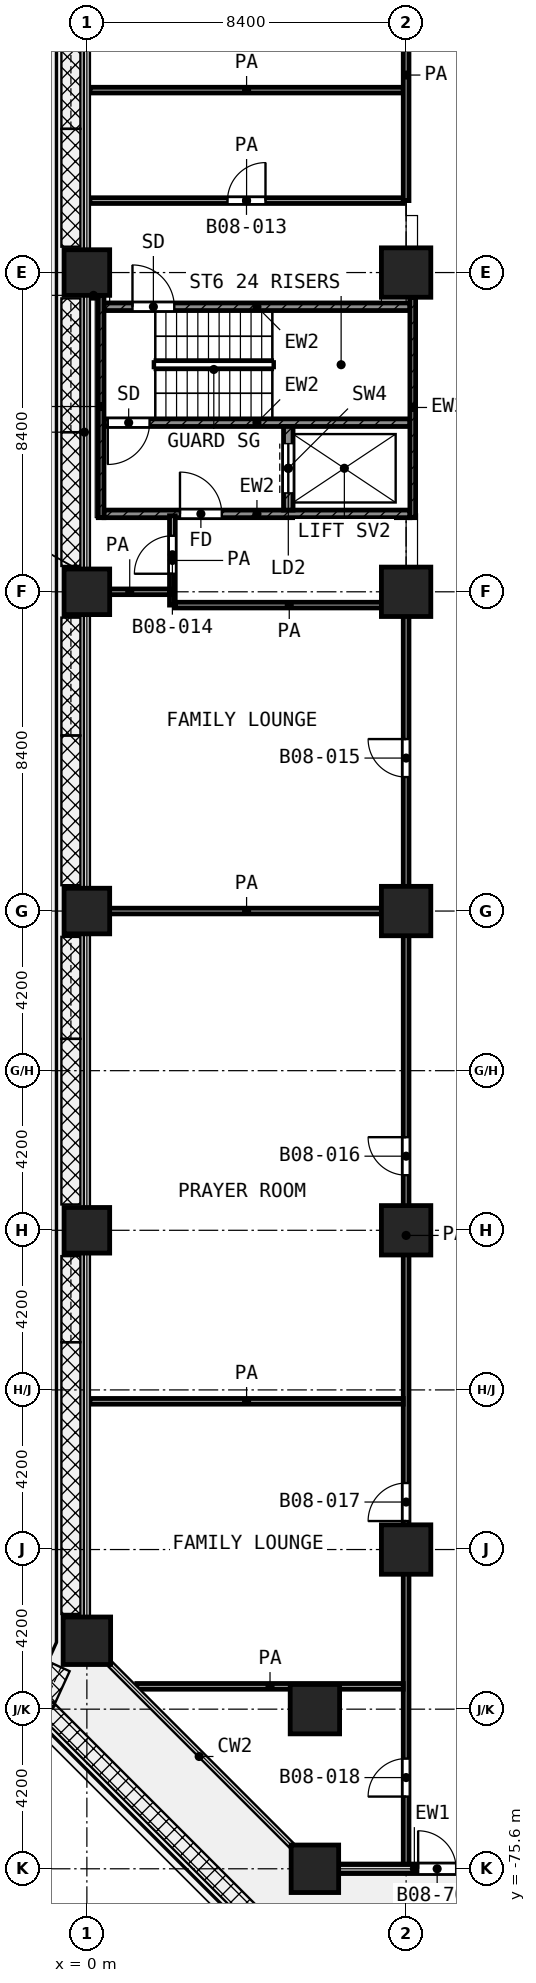
"""IFC4 building model, lengths in metres.
Left out: names, types, materials, properties, quantities, classifications, styles, units other than length and angle.
Written with IfcOpenShell. Run it as: python <this file> out.ifc"""

import sys

from ifc_helpers import new_model, si_unit, direction, frame, frame_2d, origin, origin_2d, place, context, subcontext, project, spatial, rectangle, extrude, element, fill, save


model = new_model("IFC4")
c1 = context("Model", 3, precision=1e-05, world=origin(), true_north=direction((0.0, 1.0)))
c2 = subcontext(c1, "Body", "Model", "MODEL_VIEW")
j1 = project(units=[si_unit("LENGTHUNIT", "METRE"), si_unit("PLANEANGLEUNIT", "RADIAN")], contexts=[c1])
p1 = place(None, origin())
s1 = spatial("IfcSite", under=j1, at=p1, CompositionType="ELEMENT")
p2 = place(p1, origin())
s2 = spatial("IfcBuilding", under=s1, at=p2, CompositionType="ELEMENT")
p3 = place(p2, frame((0.0, 0.0, 39.2)))
s3 = spatial("IfcBuildingStorey", under=s2, at=p3, CompositionType="ELEMENT", Elevation=39.2)
p4 = place(p3, frame((0.0, -33.6, 0.0), z_axis=(0.0, 0.0, 1.0), x_axis=(1.0, 0.0, 0.0)))
e1 = element("IfcColumn", 1, at=p4, inside=s3, PredefinedType="COLUMN", context=c2, shape_type="SweptSolid", body=[
    extrude(rectangle(XDim=1.2, YDim=1.2, at=origin_2d()), origin(), (0.0, 0.0, 1.0), 4.2),
])
p5 = place(p3, frame((8.4, -33.6, 0.0), z_axis=(0.0, 0.0, 1.0), x_axis=(1.0, 0.0, 0.0)))
e2 = element("IfcColumn", 2, at=p5, inside=s3, PredefinedType="COLUMN", context=c2, shape_type="SweptSolid", body=[
    extrude(rectangle(XDim=1.3, YDim=1.3, at=origin_2d()), origin(), (0.0, 0.0, 1.0), 4.2),
])
p6 = place(p3, frame((0.0, -42.0, 0.0), z_axis=(0.0, 0.0, 1.0), x_axis=(1.0, 0.0, 0.0)))
e3 = element("IfcColumn", 3, at=p6, inside=s3, PredefinedType="COLUMN", context=c2, shape_type="SweptSolid", body=[
    extrude(rectangle(XDim=1.2, YDim=1.2, at=origin_2d()), origin(), (0.0, 0.0, 1.0), 4.2),
])
p7 = place(p3, frame((8.4, -42.0, 0.0), z_axis=(0.0, 0.0, 1.0), x_axis=(1.0, 0.0, 0.0)))
e4 = element("IfcColumn", 4, at=p7, inside=s3, PredefinedType="COLUMN", context=c2, shape_type="SweptSolid", body=[
    extrude(rectangle(XDim=1.3, YDim=1.3, at=origin_2d()), origin(), (0.0, 0.0, 1.0), 4.2),
])
p8 = place(p3, frame((0.0, -50.4, 0.0), z_axis=(0.0, 0.0, 1.0), x_axis=(1.0, 0.0, 0.0)))
e5 = element("IfcColumn", 5, at=p8, inside=s3, PredefinedType="COLUMN", context=c2, shape_type="SweptSolid", body=[
    extrude(rectangle(XDim=1.2, YDim=1.2, at=origin_2d()), origin(), (0.0, 0.0, 1.0), 4.2),
])
p9 = place(p3, frame((8.4, -50.4, 0.0), z_axis=(0.0, 0.0, 1.0), x_axis=(1.0, 0.0, 0.0)))
e6 = element("IfcColumn", 6, at=p9, inside=s3, PredefinedType="COLUMN", context=c2, shape_type="SweptSolid", body=[
    extrude(rectangle(XDim=1.3, YDim=1.3, at=origin_2d()), origin(), (0.0, 0.0, 1.0), 4.2),
])
p10 = place(p3, frame((0.0, -58.8, 0.0), z_axis=(0.0, 0.0, 1.0), x_axis=(1.0, 0.0, 0.0)))
e7 = element("IfcColumn", 7, at=p10, inside=s3, PredefinedType="COLUMN", context=c2, shape_type="SweptSolid", body=[
    extrude(rectangle(XDim=1.2, YDim=1.2, at=origin_2d()), origin(), (0.0, 0.0, 1.0), 4.2),
])
for number, where, z_axis, x_axis in (
    (8, (8.4, -58.8, 0.0), (0.0, 0.0, 1.0), (1.0, 0.0, 0.0)),
    (9, (8.4, -67.2, 0.0), (0.0, 0.0, 1.0), (1.0, 0.0, 0.0)),
):
    element("IfcColumn", number, at=place(p3, frame(where, z_axis=z_axis, x_axis=x_axis)), inside=s3, PredefinedType="COLUMN", context=c2, shape_type="SweptSolid", body=[
        extrude(rectangle(XDim=1.3, YDim=1.3, at=origin_2d()), origin(), (0.0, 0.0, 1.0), 4.2),
    ])
p11 = place(p3, frame((0.0, -69.6, 0.0), z_axis=(0.0, 0.0, 1.0), x_axis=(1.0, 0.0, 0.0)))
e10 = element("IfcColumn", 10, at=p11, inside=s3, PredefinedType="COLUMN", context=c2, shape_type="SweptSolid", body=[
    extrude(rectangle(XDim=1.25, YDim=1.25, at=origin_2d()), origin(), (0.0, 0.0, 1.0), 4.2),
])
p12 = place(p3, frame((6.0, -71.4, 0.0), z_axis=(0.0, 0.0, 1.0), x_axis=(1.0, 0.0, 0.0)))
e11 = element("IfcColumn", 11, at=p12, inside=s3, PredefinedType="COLUMN", context=c2, shape_type="SweptSolid", body=[
    extrude(rectangle(XDim=1.3, YDim=1.3, at=origin_2d()), origin(), (0.0, 0.0, 1.0), 4.2),
])
p13 = place(p3, frame((6.0, -75.6, 0.0), z_axis=(0.0, 0.0, 1.0), x_axis=(1.0, 0.0, 0.0)))
e12 = element("IfcColumn", 12, at=p13, inside=s3, PredefinedType="COLUMN", context=c2, shape_type="SweptSolid", body=[
    extrude(rectangle(XDim=1.25, YDim=1.25, at=origin_2d()), origin(), (0.0, 0.0, 1.0), 4.2),
])
p14 = place(p3, frame((6.625, -75.6, 0.0), z_axis=(0.0, 0.0, 1.0), x_axis=(1.0, 0.0, 0.0)))
e13 = element("IfcWall", 13, at=p14, inside=s3, PredefinedType="SOLIDWALL", context=c2, shape_type="SweptSolid", body=[
    extrude(rectangle(XDim=3.983, YDim=0.25, at=frame_2d((1.992, 0.0))), origin(), (0.0, 0.0, 1.0), 3.78),
])
p15 = place(p14, frame((2.092, 0.0, 0.0)))
e14 = element("IfcOpeningElement", 14, at=p15, cuts=e13, PredefinedType="OPENING", context=c2, shape_type="SweptSolid", body=[
    extrude(rectangle(XDim=1.0, YDim=2.1, at=frame_2d((0.5, 1.05))), frame((0.0, 0.135, 0.0), z_axis=(0.0, -1.0, 0.0), x_axis=(1.0, 0.0, 0.0)), (0.0, 0.0, 1.0), 0.27),
])
p16 = place(p3, frame((0.375, -40.05, 0.0), z_axis=(0.0, 0.0, 1.0), x_axis=(0.0, 1.0, 0.0)))
e15 = element("IfcWall", 15, at=p16, inside=s3, PredefinedType="SHEAR", context=c2, shape_type="SweptSolid", body=[
    extrude(rectangle(XDim=5.85, YDim=0.15, at=frame_2d((2.925, 0.0))), origin(), (0.0, 0.0, 1.0), 3.9),
])
p17 = place(p3, frame((8.575, -40.05, 0.0), z_axis=(0.0, 0.0, 1.0), x_axis=(0.0, 1.0, 0.0)))
e16 = element("IfcWall", 16, at=p17, inside=s3, PredefinedType="SHEAR", context=c2, shape_type="SweptSolid", body=[
    extrude(rectangle(XDim=5.8, YDim=0.15, at=frame_2d((2.9, 0.0))), origin(), (0.0, 0.0, 1.0), 3.9),
])
p18 = place(p3, frame((0.45, -34.5, 0.0), z_axis=(0.0, 0.0, 1.0), x_axis=(1.0, 0.0, 0.0)))
e17 = element("IfcWall", 17, at=p18, inside=s3, PredefinedType="SHEAR", context=c2, shape_type="SweptSolid", body=[
    extrude(rectangle(XDim=8.05, YDim=0.2, at=frame_2d((4.025, 0.0))), origin(), (0.0, 0.0, 1.0), 3.9),
])
p19 = place(p18, frame((0.75, 0.0, 0.0)))
e18 = element("IfcOpeningElement", 18, at=p19, cuts=e17, PredefinedType="OPENING", context=c2, shape_type="SweptSolid", body=[
    extrude(rectangle(XDim=1.1, YDim=2.1, at=frame_2d((0.55, 1.05))), frame((0.0, 0.11, 0.0), z_axis=(0.0, -1.0, 0.0), x_axis=(1.0, 0.0, 0.0)), (0.0, 0.0, 1.0), 0.22),
])
p20 = place(p3, frame((0.45, -37.55, 0.0), z_axis=(0.0, 0.0, 1.0), x_axis=(1.0, 0.0, 0.0)))
e19 = element("IfcWall", 19, at=p20, inside=s3, PredefinedType="SHEAR", context=c2, shape_type="SweptSolid", body=[
    extrude(rectangle(XDim=8.05, YDim=0.2, at=frame_2d((4.025, 0.0))), origin(), (0.0, 0.0, 1.0), 3.9),
])
p21 = place(p20, frame((0.1, 0.0, 0.0)))
e20 = element("IfcOpeningElement", 20, at=p21, cuts=e19, PredefinedType="OPENING", context=c2, shape_type="SweptSolid", body=[
    extrude(rectangle(XDim=1.1, YDim=2.1, at=frame_2d((0.55, 1.05))), frame((0.0, 0.11, 0.0), z_axis=(0.0, -1.0, 0.0), x_axis=(1.0, 0.0, 0.0)), (0.0, 0.0, 1.0), 0.22),
])
p22 = place(p3, frame((0.45, -39.95, 0.0), z_axis=(0.0, 0.0, 1.0), x_axis=(1.0, 0.0, 0.0)))
e21 = element("IfcWall", 21, at=p22, inside=s3, PredefinedType="SHEAR", context=c2, shape_type="SweptSolid", body=[
    extrude(rectangle(XDim=8.05, YDim=0.2, at=frame_2d((4.025, 0.0))), origin(), (0.0, 0.0, 1.0), 3.9),
])
p23 = place(p22, frame((2.0, 0.0, 0.0)))
e22 = element("IfcOpeningElement", 22, at=p23, cuts=e21, PredefinedType="OPENING", context=c2, shape_type="SweptSolid", body=[
    extrude(rectangle(XDim=1.1, YDim=2.1, at=frame_2d((0.55, 1.05))), frame((0.0, 0.11, 0.0), z_axis=(0.0, -1.0, 0.0), x_axis=(1.0, 0.0, 0.0)), (0.0, 0.0, 1.0), 0.22),
])
p24 = place(p3, frame((5.3, -39.85, 0.0), z_axis=(0.0, 0.0, 1.0), x_axis=(0.0, 1.0, 0.0)))
e23 = element("IfcWall", 23, at=p24, inside=s3, PredefinedType="SHEAR", context=c2, shape_type="SweptSolid", body=[
    extrude(rectangle(XDim=2.2, YDim=0.25, at=frame_2d((1.1, 0.0))), origin(), (0.0, 0.0, 1.0), 3.9),
])
p25 = place(p24, frame((0.45, 0.0, 0.0)))
e24 = element("IfcOpeningElement", 24, at=p25, cuts=e23, PredefinedType="OPENING", context=c2, shape_type="SweptSolid", body=[
    extrude(rectangle(XDim=1.3, YDim=2.1, at=frame_2d((0.65, 1.05))), frame((0.0, 0.135, 0.0), z_axis=(0.0, -1.0, 0.0), x_axis=(1.0, 0.0, 0.0)), (0.0, 0.0, 1.0), 0.27),
])
p26 = place(p3, frame((1.313, -70.8, 0.0), z_axis=(0.0, 0.0, 1.0), x_axis=(1.0, 0.0, 0.0)))
e25 = element("IfcWall", 25, at=p26, inside=s3, PredefinedType="PARTITIONING", context=c2, shape_type="SweptSolid", body=[
    extrude(rectangle(XDim=7.012, YDim=0.15, at=frame_2d((3.506, 0.0))), origin(), (0.0, 0.0, 1.0), 3.9),
])
for number, where, z_axis, x_axis in (
    (26, (0.08, -63.3, 0.0), (0.0, 0.0, 1.0), (1.0, 0.0, 0.0)),
    (27, (0.08, -50.4, 0.0), (0.0, 0.0, 1.0), (1.0, 0.0, 0.0)),
):
    element("IfcWall", number, at=place(p3, frame(where, z_axis=z_axis, x_axis=x_axis)), inside=s3, PredefinedType="PARTITIONING", context=c2, shape_type="SweptSolid", body=[
        extrude(rectangle(XDim=8.245, YDim=0.15, at=frame_2d((4.123, 0.0))), origin(), (0.0, 0.0, 1.0), 3.9),
    ])
p27 = place(p3, frame((2.325, -42.35, 0.0), z_axis=(0.0, 0.0, 1.0), x_axis=(1.0, 0.0, 0.0)))
e28 = element("IfcWall", 28, at=p27, inside=s3, PredefinedType="PARTITIONING", context=c2, shape_type="SweptSolid", body=[
    extrude(rectangle(XDim=6.0, YDim=0.15, at=frame_2d((3.0, 0.0))), origin(), (0.0, 0.0, 1.0), 3.9),
])
p28 = place(p3, frame((0.08, -42.0, 0.0), z_axis=(0.0, 0.0, 1.0), x_axis=(1.0, 0.0, 0.0)))
e29 = element("IfcWall", 29, at=p28, inside=s3, PredefinedType="PARTITIONING", context=c2, shape_type="SweptSolid", body=[
    extrude(rectangle(XDim=2.095, YDim=0.15, at=frame_2d((1.047, 0.0))), origin(), (0.0, 0.0, 1.0), 3.9),
])
p29 = place(p3, frame((0.08, -34.2, 0.0), z_axis=(0.0, 0.0, 1.0), x_axis=(1.0, 0.0, 0.0)))
e30 = element("IfcWall", 30, at=p29, inside=s3, PredefinedType="PARTITIONING", context=c2, shape_type="SweptSolid", body=[
    extrude(rectangle(XDim=0.19, YDim=0.15, at=frame_2d((0.095, 0.0))), origin(), (0.0, 0.0, 1.0), 3.9),
])
p30 = place(p3, frame((0.08, -31.707, 0.0), z_axis=(0.0, 0.0, 1.0), x_axis=(1.0, 0.0, 0.0)))
e31 = element("IfcWall", 31, at=p30, inside=s3, PredefinedType="PARTITIONING", context=c2, shape_type="SweptSolid", body=[
    extrude(rectangle(XDim=8.245, YDim=0.15, at=frame_2d((4.123, 0.0))), origin(), (0.0, 0.0, 1.0), 3.9),
])
p31 = place(p30, frame((3.62, 0.0, 0.0)))
e32 = element("IfcOpeningElement", 32, at=p31, cuts=e31, PredefinedType="OPENING", context=c2, shape_type="SweptSolid", body=[
    extrude(rectangle(XDim=1.0, YDim=2.1, at=frame_2d((0.5, 1.05))), frame((0.0, 0.085, 0.0), z_axis=(0.0, -1.0, 0.0), x_axis=(1.0, 0.0, 0.0)), (0.0, 0.0, 1.0), 0.17),
])
p32 = place(p3, frame((0.08, -28.8, 0.0), z_axis=(0.0, 0.0, 1.0), x_axis=(1.0, 0.0, 0.0)))
e33 = element("IfcWall", 33, at=p32, inside=s3, PredefinedType="PARTITIONING", context=c2, shape_type="SweptSolid", body=[
    extrude(rectangle(XDim=8.245, YDim=0.15, at=frame_2d((4.123, 0.0))), origin(), (0.0, 0.0, 1.0), 3.9),
])
p33 = place(p3, frame((2.25, -42.35, 0.0), z_axis=(0.0, 0.0, 1.0), x_axis=(0.0, 1.0, 0.0)))
e34 = element("IfcWall", 34, at=p33, inside=s3, PredefinedType="PARTITIONING", context=c2, shape_type="SweptSolid", body=[
    extrude(rectangle(XDim=2.35, YDim=0.15, at=frame_2d((1.175, 0.0))), origin(), (0.0, 0.0, 1.0), 3.9),
])
p34 = place(p33, frame((0.825, 0.0, 0.0)))
e35 = element("IfcOpeningElement", 35, at=p34, cuts=e34, PredefinedType="OPENING", context=c2, shape_type="SweptSolid", body=[
    extrude(rectangle(XDim=1.0, YDim=2.1, at=frame_2d((0.5, 1.05))), frame((0.0, 0.085, 0.0), z_axis=(0.0, -1.0, 0.0), x_axis=(1.0, 0.0, 0.0)), (0.0, 0.0, 1.0), 0.17),
])
p35 = place(p3, frame((8.4, -75.52, 0.0), z_axis=(0.0, 0.0, 1.0), x_axis=(0.0, 1.0, 0.0)))
e36 = element("IfcWall", 36, at=p35, inside=s3, PredefinedType="PARTITIONING", context=c2, shape_type="SweptSolid", body=[
    extrude(rectangle(XDim=33.17, YDim=0.15, at=frame_2d((16.585, 0.0))), origin(), (0.0, 0.0, 1.0), 3.9),
])
p36 = place(p35, frame((28.645, 0.0, 0.0)))
e37 = element("IfcOpeningElement", 37, at=p36, cuts=e36, PredefinedType="OPENING", context=c2, shape_type="SweptSolid", body=[
    extrude(rectangle(XDim=1.0, YDim=2.1, at=frame_2d((0.5, 1.05))), frame((0.0, 0.085, 0.0), z_axis=(0.0, -1.0, 0.0), x_axis=(1.0, 0.0, 0.0)), (0.0, 0.0, 1.0), 0.17),
])
p37 = place(p35, frame((18.17, 0.0, 0.0)))
e38 = element("IfcOpeningElement", 38, at=p37, cuts=e36, PredefinedType="OPENING", context=c2, shape_type="SweptSolid", body=[
    extrude(rectangle(XDim=1.0, YDim=2.1, at=frame_2d((0.5, 1.05))), frame((0.0, 0.085, 0.0), z_axis=(0.0, -1.0, 0.0), x_axis=(1.0, 0.0, 0.0)), (0.0, 0.0, 1.0), 0.17),
])
p38 = place(p35, frame((9.07, 0.0, 0.0)))
e39 = element("IfcOpeningElement", 39, at=p38, cuts=e36, PredefinedType="OPENING", context=c2, shape_type="SweptSolid", body=[
    extrude(rectangle(XDim=1.0, YDim=2.1, at=frame_2d((0.5, 1.05))), frame((0.0, 0.085, 0.0), z_axis=(0.0, -1.0, 0.0), x_axis=(1.0, 0.0, 0.0)), (0.0, 0.0, 1.0), 0.17),
])
p39 = place(p35, frame((1.82, 0.0, 0.0)))
e40 = element("IfcOpeningElement", 40, at=p39, cuts=e36, PredefinedType="OPENING", context=c2, shape_type="SweptSolid", body=[
    extrude(rectangle(XDim=1.0, YDim=2.1, at=frame_2d((0.5, 1.05))), frame((0.0, 0.085, 0.0), z_axis=(0.0, -1.0, 0.0), x_axis=(1.0, 0.0, 0.0)), (0.0, 0.0, 1.0), 0.17),
])
p40 = place(p3, frame((8.4, -31.707, 0.0), z_axis=(0.0, 0.0, 1.0), x_axis=(0.0, 1.0, 0.0)))
e41 = element("IfcWall", 41, at=p40, inside=s3, PredefinedType="PARTITIONING", context=c2, shape_type="SweptSolid", body=[
    extrude(rectangle(XDim=6.607, YDim=0.15, at=frame_2d((3.303, 0.0))), origin(), (0.0, 0.0, 1.0), 3.9),
])
p41 = place(p40, frame((4.257, 0.0, 0.0)))
e42 = element("IfcOpeningElement", 42, at=p41, cuts=e41, PredefinedType="OPENING", context=c2, shape_type="SweptSolid", body=[
    extrude(rectangle(XDim=0.9, YDim=2.1, at=frame_2d((0.45, 1.05))), frame((0.0, 0.085, 0.0), z_axis=(0.0, -1.0, 0.0), x_axis=(1.0, 0.0, 0.0)), (0.0, 0.0, 1.0), 0.17),
])
p42 = place(p15, origin())
e43 = element("IfcDoor", 43, at=p42, inside=s3, OperationType="SINGLE_SWING_LEFT", PredefinedType="DOOR", context=c2, shape_type="SweptSolid", body=[
    extrude(rectangle(XDim=1.0, YDim=2.1, at=frame_2d((0.5, 1.05))), frame((0.0, 0.025, 0.0), z_axis=(0.0, -1.0, 0.0), x_axis=(1.0, 0.0, 0.0)), (0.0, 0.0, 1.0), 0.05),
])
fill(e14, e43)
p43 = place(p19, origin())
e44 = element("IfcDoor", 44, at=p43, inside=s3, OperationType="SINGLE_SWING_LEFT", PredefinedType="DOOR", context=c2, shape_type="SweptSolid", body=[
    extrude(rectangle(XDim=1.1, YDim=2.1, at=frame_2d((0.55, 1.05))), frame((0.0, 0.025, 0.0), z_axis=(0.0, -1.0, 0.0), x_axis=(1.0, 0.0, 0.0)), (0.0, 0.0, 1.0), 0.05),
])
fill(e18, e44)
p44 = place(p21, frame((1.1, 0.0, 0.0), z_axis=(0.0, 0.0, 1.0), x_axis=(-1.0, 0.0, 0.0)))
e45 = element("IfcDoor", 45, at=p44, inside=s3, OperationType="SINGLE_SWING_LEFT", PredefinedType="DOOR", context=c2, shape_type="SweptSolid", body=[
    extrude(rectangle(XDim=1.1, YDim=2.1, at=frame_2d((0.55, 1.05))), frame((0.0, 0.025, 0.0), z_axis=(0.0, -1.0, 0.0), x_axis=(1.0, 0.0, 0.0)), (0.0, 0.0, 1.0), 0.05),
])
fill(e20, e45)
p45 = place(p25, origin())
e46 = element("IfcDoor", 46, at=p45, inside=s3, OperationType="DOUBLE_DOOR_SLIDING", PredefinedType="DOOR", context=c2, shape_type="SweptSolid", body=[
    extrude(rectangle(XDim=1.3, YDim=2.1, at=frame_2d((0.65, 1.05))), frame((0.0, 0.025, 0.0), z_axis=(0.0, -1.0, 0.0), x_axis=(1.0, 0.0, 0.0)), (0.0, 0.0, 1.0), 0.05),
])
fill(e24, e46)
p46 = place(p23, origin())
e47 = element("IfcDoor", 47, at=p46, inside=s3, OperationType="SINGLE_SWING_LEFT", PredefinedType="DOOR", context=c2, shape_type="SweptSolid", body=[
    extrude(rectangle(XDim=1.1, YDim=2.1, at=frame_2d((0.55, 1.05))), frame((0.0, 0.025, 0.0), z_axis=(0.0, -1.0, 0.0), x_axis=(1.0, 0.0, 0.0)), (0.0, 0.0, 1.0), 0.05),
])
fill(e22, e47)
p47 = place(p31, origin())
e48 = element("IfcDoor", 48, at=p47, inside=s3, OperationType="SINGLE_SWING_RIGHT", PredefinedType="DOOR", context=c2, shape_type="SweptSolid", body=[
    extrude(rectangle(XDim=1.0, YDim=2.1, at=frame_2d((0.5, 1.05))), frame((0.0, 0.025, 0.0), z_axis=(0.0, -1.0, 0.0), x_axis=(1.0, 0.0, 0.0)), (0.0, 0.0, 1.0), 0.05),
])
fill(e32, e48)
p48 = place(p34, origin())
e49 = element("IfcDoor", 49, at=p48, inside=s3, OperationType="SINGLE_SWING_LEFT", PredefinedType="DOOR", context=c2, shape_type="SweptSolid", body=[
    extrude(rectangle(XDim=1.0, YDim=2.1, at=frame_2d((0.5, 1.05))), frame((0.0, 0.025, 0.0), z_axis=(0.0, -1.0, 0.0), x_axis=(1.0, 0.0, 0.0)), (0.0, 0.0, 1.0), 0.05),
])
fill(e35, e49)
p49 = place(p36, origin())
e50 = element("IfcDoor", 50, at=p49, inside=s3, OperationType="SINGLE_SWING_RIGHT", PredefinedType="DOOR", context=c2, shape_type="SweptSolid", body=[
    extrude(rectangle(XDim=1.0, YDim=2.1, at=frame_2d((0.5, 1.05))), frame((0.0, 0.025, 0.0), z_axis=(0.0, -1.0, 0.0), x_axis=(1.0, 0.0, 0.0)), (0.0, 0.0, 1.0), 0.05),
])
fill(e37, e50)
p50 = place(p37, origin())
e51 = element("IfcDoor", 51, at=p50, inside=s3, OperationType="SINGLE_SWING_RIGHT", PredefinedType="DOOR", context=c2, shape_type="SweptSolid", body=[
    extrude(rectangle(XDim=1.0, YDim=2.1, at=frame_2d((0.5, 1.05))), frame((0.0, 0.025, 0.0), z_axis=(0.0, -1.0, 0.0), x_axis=(1.0, 0.0, 0.0)), (0.0, 0.0, 1.0), 0.05),
])
fill(e38, e51)
p51 = place(p38, origin())
e52 = element("IfcDoor", 52, at=p51, inside=s3, OperationType="SINGLE_SWING_LEFT", PredefinedType="DOOR", context=c2, shape_type="SweptSolid", body=[
    extrude(rectangle(XDim=1.0, YDim=2.1, at=frame_2d((0.5, 1.05))), frame((0.0, 0.025, 0.0), z_axis=(0.0, -1.0, 0.0), x_axis=(1.0, 0.0, 0.0)), (0.0, 0.0, 1.0), 0.05),
])
fill(e39, e52)
p52 = place(p39, origin())
e53 = element("IfcDoor", 53, at=p52, inside=s3, OperationType="SINGLE_SWING_LEFT", PredefinedType="DOOR", context=c2, shape_type="SweptSolid", body=[
    extrude(rectangle(XDim=1.0, YDim=2.1, at=frame_2d((0.5, 1.05))), frame((0.0, 0.025, 0.0), z_axis=(0.0, -1.0, 0.0), x_axis=(1.0, 0.0, 0.0)), (0.0, 0.0, 1.0), 0.05),
])
fill(e40, e53)
save(model, sys.argv[1])
